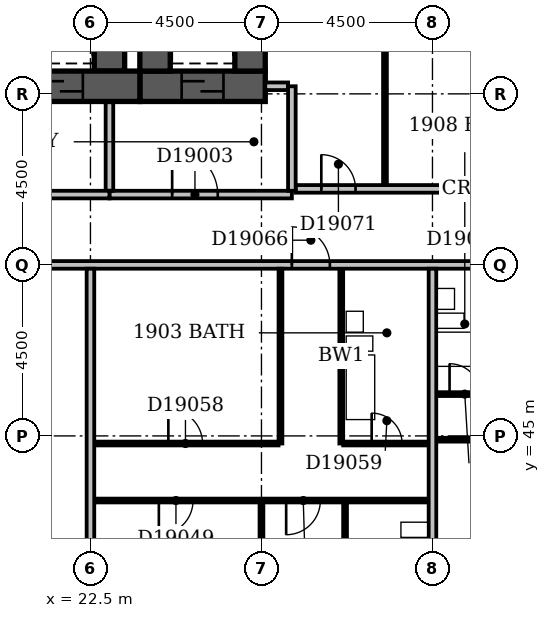
"""IFC4 building model, lengths in metres.
Left out: names, types, materials, properties, quantities, classifications, styles, units other than length and angle.
Written with IfcOpenShell. Run it as: python <this file> out.ifc"""

import sys

from ifc_helpers import new_model, si_unit, direction, frame, frame_2d, origin, place, context, subcontext, project, spatial, rectangle, extrude, element, fill, save


model = new_model("IFC4")
c1 = context("Model", 3, precision=1e-05, world=origin(), true_north=direction((0.0, 1.0)))
c2 = subcontext(c1, "Body", "Model", "MODEL_VIEW")
j1 = project(units=[si_unit("LENGTHUNIT", "METRE"), si_unit("PLANEANGLEUNIT", "RADIAN")], contexts=[c1])
p1 = place(None, origin())
s1 = spatial("IfcSite", under=j1, at=p1, CompositionType="ELEMENT")
p2 = place(p1, origin())
s2 = spatial("IfcBuilding", under=s1, at=p2, CompositionType="ELEMENT")
p3 = place(p2, frame((0.0, 0.0, 79.4)))
s3 = spatial("IfcBuildingStorey", under=s2, at=p3, CompositionType="ELEMENT", Elevation=79.4)
p4 = place(p3, frame((7.35, 54.2, -0.3), z_axis=(0.0, 0.0, 1.0), x_axis=(1.0, 0.0, 0.0)))
e1 = element("IfcWall", 1, at=p4, inside=s3, PredefinedType="SHEAR", context=c2, shape_type="SweptSolid", body=[
    extrude(rectangle(XDim=16.45, YDim=0.8, at=frame_2d((8.225, 0.0))), origin(), (0.0, 0.0, 1.0), 3.6),
])
p5 = place(p4, frame((1.35, 0.0, 0.3)))
e2 = element("IfcOpeningElement", 2, at=p5, cuts=e1, PredefinedType="OPENING", context=c2, shape_type="SweptSolid", body=[
    extrude(rectangle(XDim=1.1, YDim=2.1, at=frame_2d((0.55, 1.05))), frame((0.0, 0.412, 0.0), z_axis=(0.0, -1.0, 0.0), x_axis=(1.0, 0.0, 0.0)), (0.0, 0.0, 1.0), 0.824),
])
p6 = place(p4, frame((3.85, 0.0, 0.3)))
e3 = element("IfcOpeningElement", 3, at=p6, cuts=e1, PredefinedType="OPENING", context=c2, shape_type="SweptSolid", body=[
    extrude(rectangle(XDim=1.1, YDim=2.1, at=frame_2d((0.55, 1.05))), frame((0.0, 0.412, 0.0), z_axis=(0.0, -1.0, 0.0), x_axis=(1.0, 0.0, 0.0)), (0.0, 0.0, 1.0), 0.824),
])
p7 = place(p4, frame((6.35, 0.0, 0.3)))
e4 = element("IfcOpeningElement", 4, at=p7, cuts=e1, PredefinedType="OPENING", context=c2, shape_type="SweptSolid", body=[
    extrude(rectangle(XDim=1.1, YDim=2.1, at=frame_2d((0.55, 1.05))), frame((0.0, 0.412, 0.0), z_axis=(0.0, -1.0, 0.0), x_axis=(1.0, 0.0, 0.0)), (0.0, 0.0, 1.0), 0.824),
])
p8 = place(p4, frame((8.85, 0.0, 0.3)))
e5 = element("IfcOpeningElement", 5, at=p8, cuts=e1, PredefinedType="OPENING", context=c2, shape_type="SweptSolid", body=[
    extrude(rectangle(XDim=1.1, YDim=2.1, at=frame_2d((0.55, 1.05))), frame((0.0, 0.412, 0.0), z_axis=(0.0, -1.0, 0.0), x_axis=(1.0, 0.0, 0.0)), (0.0, 0.0, 1.0), 0.824),
])
p9 = place(p4, frame((11.35, 0.0, 0.3)))
e6 = element("IfcOpeningElement", 6, at=p9, cuts=e1, PredefinedType="OPENING", context=c2, shape_type="SweptSolid", body=[
    extrude(rectangle(XDim=1.1, YDim=2.1, at=frame_2d((0.55, 1.05))), frame((0.0, 0.412, 0.0), z_axis=(0.0, -1.0, 0.0), x_axis=(1.0, 0.0, 0.0)), (0.0, 0.0, 1.0), 0.824),
])
p10 = place(p4, frame((13.85, 0.0, 0.3)))
e7 = element("IfcOpeningElement", 7, at=p10, cuts=e1, PredefinedType="OPENING", context=c2, shape_type="SweptSolid", body=[
    extrude(rectangle(XDim=1.1, YDim=2.1, at=frame_2d((0.55, 1.05))), frame((0.0, 0.412, 0.0), z_axis=(0.0, -1.0, 0.0), x_axis=(1.0, 0.0, 0.0)), (0.0, 0.0, 1.0), 0.824),
])
p11 = place(p3, frame((23.0, 54.6, -0.3), z_axis=(0.0, 0.0, 1.0), x_axis=(0.0, 1.0, 0.0)))
e8 = element("IfcWall", 8, at=p11, inside=s3, PredefinedType="SHEAR", context=c2, shape_type="SweptSolid", body=[
    extrude(rectangle(XDim=3.0, YDim=0.8, at=frame_2d((1.5, 0.0))), origin(), (0.0, 0.0, 1.0), 3.6),
])
p12 = place(p3, frame((23.8, 54.2, -0.3), z_axis=(0.0, 0.0, 1.0), x_axis=(1.0, 0.0, 0.0)))
e9 = element("IfcWall", 9, at=p12, inside=s3, PredefinedType="SHEAR", context=c2, shape_type="SweptSolid", body=[
    extrude(rectangle(XDim=3.3, YDim=0.8, at=frame_2d((1.65, 0.0))), origin(), (0.0, 0.0, 1.0), 3.6),
])
p13 = place(p12, frame((1.1, 0.0, 0.3)))
e10 = element("IfcOpeningElement", 10, at=p13, cuts=e9, PredefinedType="OPENING", context=c2, shape_type="SweptSolid", body=[
    extrude(rectangle(XDim=1.1, YDim=2.1, at=frame_2d((0.55, 1.05))), frame((0.0, 0.412, 0.0), z_axis=(0.0, -1.0, 0.0), x_axis=(1.0, 0.0, 0.0)), (0.0, 0.0, 1.0), 0.824),
])
for number, where, z_axis, x_axis in (
    (11, (24.2, 54.6, -0.3), (0.0, 0.0, 1.0), (0.0, 1.0, 0.0)),
    (12, (26.7, 54.6, -0.3), (0.0, 0.0, 1.0), (0.0, 1.0, 0.0)),
):
    element("IfcWall", number, at=place(p3, frame(where, z_axis=z_axis, x_axis=x_axis)), inside=s3, PredefinedType="SHEAR", context=c2, shape_type="SweptSolid", body=[
        extrude(rectangle(XDim=3.0, YDim=0.8, at=frame_2d((1.5, 0.0))), origin(), (0.0, 0.0, 1.0), 3.6),
    ])
p14 = place(p3, frame((8.0, 51.35, 0.0), z_axis=(0.0, 0.0, 1.0), x_axis=(1.0, 0.0, 0.0)))
e13 = element("IfcWall", 13, at=p14, inside=s3, PredefinedType="PARTITIONING", context=c2, shape_type="SweptSolid", body=[
    extrude(rectangle(XDim=15.0, YDim=0.2, at=frame_2d((7.5, 0.0))), origin(), (0.0, 0.0, 1.0), 3.3),
])
p15 = place(p14, frame((3.4, 0.0, 0.0)))
e14 = element("IfcOpeningElement", 14, at=p15, cuts=e13, PredefinedType="OPENING", context=c2, shape_type="SweptSolid", body=[
    extrude(rectangle(XDim=1.2, YDim=2.1, at=frame_2d((0.6, 1.05))), frame((0.0, 0.112, 0.0), z_axis=(0.0, -1.0, 0.0), x_axis=(1.0, 0.0, 0.0)), (0.0, 0.0, 1.0), 0.224),
])
p16 = place(p14, frame((9.4, 0.0, 0.0)))
e15 = element("IfcOpeningElement", 15, at=p16, cuts=e13, PredefinedType="OPENING", context=c2, shape_type="SweptSolid", body=[
    extrude(rectangle(XDim=1.2, YDim=2.1, at=frame_2d((0.6, 1.05))), frame((0.0, 0.112, 0.0), z_axis=(0.0, -1.0, 0.0), x_axis=(1.0, 0.0, 0.0)), (0.0, 0.0, 1.0), 0.224),
])
p17 = place(p3, frame((23.0, 51.45, 0.0), z_axis=(0.0, 0.0, 1.0), x_axis=(0.0, 1.0, 0.0)))
e16 = element("IfcWall", 16, at=p17, inside=s3, PredefinedType="PARTITIONING", context=c2, shape_type="SweptSolid", body=[
    extrude(rectangle(XDim=2.33, YDim=0.2, at=frame_2d((1.165, 0.0))), origin(), (0.0, 0.0, 1.0), 3.3),
])
p18 = place(p3, frame((23.0, 51.35, 0.0), z_axis=(0.0, 0.0, 1.0), x_axis=(1.0, 0.0, 0.0)))
e17 = element("IfcWall", 17, at=p18, inside=s3, PredefinedType="PARTITIONING", context=c2, shape_type="SweptSolid", body=[
    extrude(rectangle(XDim=4.8, YDim=0.2, at=frame_2d((2.4, 0.0))), origin(), (0.0, 0.0, 1.0), 3.3),
])
p19 = place(p18, frame((1.65, 0.0, 0.0)))
e18 = element("IfcOpeningElement", 18, at=p19, cuts=e17, PredefinedType="OPENING", context=c2, shape_type="SweptSolid", body=[
    extrude(rectangle(XDim=1.2, YDim=2.1, at=frame_2d((0.6, 1.05))), frame((0.0, 0.112, 0.0), z_axis=(0.0, -1.0, 0.0), x_axis=(1.0, 0.0, 0.0)), (0.0, 0.0, 1.0), 0.224),
])
p20 = place(p3, frame((27.8, 51.45, 0.0), z_axis=(0.0, 0.0, 1.0), x_axis=(0.0, 1.0, 0.0)))
e19 = element("IfcWall", 19, at=p20, inside=s3, PredefinedType="PARTITIONING", context=c2, shape_type="SweptSolid", body=[
    extrude(rectangle(XDim=2.75, YDim=0.2, at=frame_2d((1.375, 0.0))), origin(), (0.0, 0.0, 1.0), 3.3),
])
p21 = place(p3, frame((27.1, 54.2, 0.0), z_axis=(0.0, 0.0, 1.0), x_axis=(1.0, 0.0, 0.0)))
e20 = element("IfcWall", 20, at=p21, inside=s3, PredefinedType="PARTITIONING", context=c2, shape_type="SweptSolid", body=[
    extrude(rectangle(XDim=0.6, YDim=0.2, at=frame_2d((0.3, 0.0))), origin(), (0.0, 0.0, 1.0), 3.3),
])
p22 = place(p3, frame((22.5, 36.6, 0.0), z_axis=(0.0, 0.0, 1.0), x_axis=(0.0, 1.0, 0.0)))
e21 = element("IfcWall", 21, at=p22, inside=s3, PredefinedType="PARTITIONING", context=c2, shape_type="SweptSolid", body=[
    extrude(rectangle(XDim=12.8, YDim=0.2, at=frame_2d((6.4, 0.0))), origin(), (0.0, 0.0, 1.0), 3.3),
])
p23 = place(p3, frame((27.0, 36.6, 0.0), z_axis=(0.0, 0.0, 1.0), x_axis=(0.0, 1.0, 0.0)))
e22 = element("IfcWall", 22, at=p23, inside=s3, PredefinedType="PARTITIONING", context=c2, shape_type="SweptSolid", body=[
    extrude(rectangle(XDim=6.65, YDim=0.1, at=frame_2d((3.325, 0.0))), origin(), (0.0, 0.0, 1.0), 2.6),
])
p24 = place(p3, frame((31.5, 36.6, 0.0), z_axis=(0.0, 0.0, 1.0), x_axis=(0.0, 1.0, 0.0)))
e23 = element("IfcWall", 23, at=p24, inside=s3, PredefinedType="PARTITIONING", context=c2, shape_type="SweptSolid", body=[
    extrude(rectangle(XDim=12.8, YDim=0.2, at=frame_2d((6.4, 0.0))), origin(), (0.0, 0.0, 1.0), 3.3),
])
p25 = place(p3, frame((29.2, 40.4, 0.0), z_axis=(0.0, 0.0, 1.0), x_axis=(0.0, 1.0, 0.0)))
e24 = element("IfcWall", 24, at=p25, inside=s3, PredefinedType="PLUMBINGWALL", context=c2, shape_type="SweptSolid", body=[
    extrude(rectangle(XDim=2.85, YDim=0.1, at=frame_2d((1.425, 0.0))), origin(), (0.0, 0.0, 1.0), 3.3),
])
p26 = place(p25, frame((1.05, 0.0, 0.0)))
e25 = element("IfcOpeningElement", 25, at=p26, cuts=e24, PredefinedType="OPENING", context=c2, shape_type="SweptSolid", body=[
    extrude(rectangle(XDim=0.8, YDim=2.1, at=frame_2d((0.4, 1.05))), frame((0.0, 0.062, 0.0), z_axis=(0.0, -1.0, 0.0), x_axis=(1.0, 0.0, 0.0)), (0.0, 0.0, 1.0), 0.124),
])
p27 = place(p3, frame((22.6, 43.3, 0.0), z_axis=(0.0, 0.0, 1.0), x_axis=(1.0, 0.0, 0.0)))
e26 = element("IfcWall", 26, at=p27, inside=s3, PredefinedType="PARTITIONING", context=c2, shape_type="SweptSolid", body=[
    extrude(rectangle(XDim=8.8, YDim=0.1, at=frame_2d((4.4, 0.0))), origin(), (0.0, 0.0, 1.0), 3.3),
])
p28 = place(p27, frame((1.7, 0.0, 0.0)))
e27 = element("IfcOpeningElement", 27, at=p28, cuts=e26, PredefinedType="OPENING", context=c2, shape_type="SweptSolid", body=[
    extrude(rectangle(XDim=0.9, YDim=2.1, at=frame_2d((0.45, 1.05))), frame((0.0, 0.062, 0.0), z_axis=(0.0, -1.0, 0.0), x_axis=(1.0, 0.0, 0.0)), (0.0, 0.0, 1.0), 0.124),
])
p29 = place(p27, frame((5.05, 0.0, 0.0)))
e28 = element("IfcOpeningElement", 28, at=p29, cuts=e26, PredefinedType="OPENING", context=c2, shape_type="SweptSolid", body=[
    extrude(rectangle(XDim=0.9, YDim=2.1, at=frame_2d((0.45, 1.05))), frame((0.0, 0.062, 0.0), z_axis=(0.0, -1.0, 0.0), x_axis=(1.0, 0.0, 0.0)), (0.0, 0.0, 1.0), 0.124),
])
p30 = place(p3, frame((22.6, 44.8, 0.0), z_axis=(0.0, 0.0, 1.0), x_axis=(1.0, 0.0, 0.0)))
e29 = element("IfcWall", 29, at=p30, inside=s3, PredefinedType="PARTITIONING", context=c2, shape_type="SweptSolid", body=[
    extrude(rectangle(XDim=4.85, YDim=0.1, at=frame_2d((2.425, 0.0))), origin(), (0.0, 0.0, 1.0), 3.3),
])
p31 = place(p30, frame((1.95, 0.0, 0.0)))
e30 = element("IfcOpeningElement", 30, at=p31, cuts=e29, PredefinedType="OPENING", context=c2, shape_type="SweptSolid", body=[
    extrude(rectangle(XDim=0.9, YDim=2.1, at=frame_2d((0.45, 1.05))), frame((0.0, 0.062, 0.0), z_axis=(0.0, -1.0, 0.0), x_axis=(1.0, 0.0, 0.0)), (0.0, 0.0, 1.0), 0.124),
])
p32 = place(p3, frame((27.5, 44.8, 0.0), z_axis=(0.0, 0.0, 1.0), x_axis=(0.0, 1.0, 0.0)))
e31 = element("IfcWall", 31, at=p32, inside=s3, PredefinedType="PARTITIONING", context=c2, shape_type="SweptSolid", body=[
    extrude(rectangle(XDim=4.6, YDim=0.1, at=frame_2d((2.3, 0.0))), origin(), (0.0, 0.0, 1.0), 2.6),
])
p33 = place(p3, frame((29.1, 44.8, 0.0), z_axis=(0.0, 0.0, 1.0), x_axis=(0.0, 1.0, 0.0)))
e32 = element("IfcWall", 32, at=p33, inside=s3, PredefinedType="PLUMBINGWALL", context=c2, shape_type="SweptSolid", body=[
    extrude(rectangle(XDim=4.6, YDim=0.1, at=frame_2d((2.3, 0.0))), origin(), (0.0, 0.0, 1.0), 3.3),
])
p34 = place(p3, frame((29.15, 44.8, 0.0), z_axis=(0.0, 0.0, 1.0), x_axis=(1.0, 0.0, 0.0)))
e33 = element("IfcWall", 33, at=p34, inside=s3, PredefinedType="PARTITIONING", context=c2, shape_type="SweptSolid", body=[
    extrude(rectangle(XDim=2.25, YDim=0.1, at=frame_2d((1.125, 0.0))), origin(), (0.0, 0.0, 1.0), 3.3),
])
p35 = place(p34, frame((0.75, 0.0, 0.0)))
e34 = element("IfcOpeningElement", 34, at=p35, cuts=e33, PredefinedType="OPENING", context=c2, shape_type="SweptSolid", body=[
    extrude(rectangle(XDim=0.8, YDim=2.1, at=frame_2d((0.4, 1.05))), frame((0.0, 0.062, 0.0), z_axis=(0.0, -1.0, 0.0), x_axis=(1.0, 0.0, 0.0)), (0.0, 0.0, 1.0), 0.124),
])
p36 = place(p3, frame((31.6, 44.9, 0.0), z_axis=(0.0, 0.0, 1.0), x_axis=(1.0, 0.0, 0.0)))
e35 = element("IfcWall", 35, at=p36, inside=s3, PredefinedType="PARTITIONING", context=c2, shape_type="SweptSolid", body=[
    extrude(rectangle(XDim=4.3, YDim=0.1, at=frame_2d((2.15, 0.0))), origin(), (0.0, 0.0, 1.0), 3.3),
])
p37 = place(p36, frame((1.7, 0.0, 0.0)))
e36 = element("IfcOpeningElement", 36, at=p37, cuts=e35, PredefinedType="OPENING", context=c2, shape_type="SweptSolid", body=[
    extrude(rectangle(XDim=0.9, YDim=2.1, at=frame_2d((0.45, 1.05))), frame((0.0, 0.062, 0.0), z_axis=(0.0, -1.0, 0.0), x_axis=(1.0, 0.0, 0.0)), (0.0, 0.0, 1.0), 0.124),
])
p38 = place(p3, frame((31.6, 46.1, 0.0), z_axis=(0.0, 0.0, 1.0), x_axis=(1.0, 0.0, 0.0)))
e37 = element("IfcWall", 37, at=p38, inside=s3, PredefinedType="PARTITIONING", context=c2, shape_type="SweptSolid", body=[
    extrude(rectangle(XDim=1.55, YDim=0.1, at=frame_2d((0.775, 0.0))), origin(), (0.0, 0.0, 1.0), 3.3),
])
p39 = place(p38, frame((0.35, 0.0, 0.0)))
e38 = element("IfcOpeningElement", 38, at=p39, cuts=e37, PredefinedType="OPENING", context=c2, shape_type="SweptSolid", body=[
    extrude(rectangle(XDim=0.8, YDim=2.1, at=frame_2d((0.4, 1.05))), frame((0.0, 0.062, 0.0), z_axis=(0.0, -1.0, 0.0), x_axis=(1.0, 0.0, 0.0)), (0.0, 0.0, 1.0), 0.124),
])
p40 = place(p3, frame((9.1, 49.5, 0.0), z_axis=(0.0, 0.0, 1.0), x_axis=(1.0, 0.0, 0.0)))
e39 = element("IfcWall", 39, at=p40, inside=s3, PredefinedType="PARTITIONING", context=c2, shape_type="SweptSolid", body=[
    extrude(rectangle(XDim=57.8, YDim=0.2, at=frame_2d((28.9, 0.0))), origin(), (0.0, 0.0, 1.0), 3.3),
])
p41 = place(p40, frame((18.7, 0.0, 0.0)))
e40 = element("IfcOpeningElement", 40, at=p41, cuts=e39, PredefinedType="OPENING", context=c2, shape_type="SweptSolid", body=[
    extrude(rectangle(XDim=1.0, YDim=2.1, at=frame_2d((0.5, 1.05))), frame((0.0, 0.112, 0.0), z_axis=(0.0, -1.0, 0.0), x_axis=(1.0, 0.0, 0.0)), (0.0, 0.0, 1.0), 0.224),
])
p42 = place(p40, frame((24.35, 0.0, 0.0)))
e41 = element("IfcOpeningElement", 41, at=p42, cuts=e39, PredefinedType="OPENING", context=c2, shape_type="SweptSolid", body=[
    extrude(rectangle(XDim=1.0, YDim=2.1, at=frame_2d((0.5, 1.05))), frame((0.0, 0.112, 0.0), z_axis=(0.0, -1.0, 0.0), x_axis=(1.0, 0.0, 0.0)), (0.0, 0.0, 1.0), 0.224),
])
p43 = place(p40, frame((27.2, 0.0, 0.0)))
e42 = element("IfcOpeningElement", 42, at=p43, cuts=e39, PredefinedType="OPENING", context=c2, shape_type="SweptSolid", body=[
    extrude(rectangle(XDim=1.0, YDim=2.1, at=frame_2d((0.5, 1.05))), frame((0.0, 0.112, 0.0), z_axis=(0.0, -1.0, 0.0), x_axis=(1.0, 0.0, 0.0)), (0.0, 0.0, 1.0), 0.224),
])
p44 = place(p40, frame((43.1, 0.0, 0.0)))
e43 = element("IfcOpeningElement", 43, at=p44, cuts=e39, PredefinedType="OPENING", context=c2, shape_type="SweptSolid", body=[
    extrude(rectangle(XDim=1.0, YDim=2.1, at=frame_2d((0.5, 1.05))), frame((0.0, 0.112, 0.0), z_axis=(0.0, -1.0, 0.0), x_axis=(1.0, 0.0, 0.0)), (0.0, 0.0, 1.0), 0.224),
])
p45 = place(p40, frame((3.9, 0.0, 0.0)))
e44 = element("IfcOpeningElement", 44, at=p45, cuts=e39, PredefinedType="OPENING", context=c2, shape_type="SweptSolid", body=[
    extrude(rectangle(XDim=0.9, YDim=2.1, at=frame_2d((0.45, 1.05))), frame((0.0, 0.112, 0.0), z_axis=(0.0, -1.0, 0.0), x_axis=(1.0, 0.0, 0.0)), (0.0, 0.0, 1.0), 0.224),
])
p46 = place(p3, frame((27.9, 51.5, 0.0), z_axis=(0.0, 0.0, 1.0), x_axis=(1.0, 0.0, 0.0)))
e45 = element("IfcWall", 45, at=p46, inside=s3, PredefinedType="PARTITIONING", context=c2, shape_type="SweptSolid", body=[
    extrude(rectangle(XDim=9.3, YDim=0.2, at=frame_2d((4.65, 0.0))), origin(), (0.0, 0.0, 1.0), 3.3),
])
p47 = place(p46, frame((0.675, 0.0, 0.0)))
e46 = element("IfcOpeningElement", 46, at=p47, cuts=e45, PredefinedType="OPENING", context=c2, shape_type="SweptSolid", body=[
    extrude(rectangle(XDim=0.9, YDim=2.1, at=frame_2d((0.45, 1.05))), frame((0.0, 0.112, 0.0), z_axis=(0.0, -1.0, 0.0), x_axis=(1.0, 0.0, 0.0)), (0.0, 0.0, 1.0), 0.224),
])
p48 = place(p46, frame((5.375, 0.0, 0.0)))
e47 = element("IfcOpeningElement", 47, at=p48, cuts=e45, PredefinedType="OPENING", context=c2, shape_type="SweptSolid", body=[
    extrude(rectangle(XDim=1.0, YDim=2.1, at=frame_2d((0.5, 1.05))), frame((0.0, 0.112, 0.0), z_axis=(0.0, -1.0, 0.0), x_axis=(1.0, 0.0, 0.0)), (0.0, 0.0, 1.0), 0.224),
])
p49 = place(p3, frame((30.25, 51.6, 0.0), z_axis=(0.0, 0.0, 1.0), x_axis=(0.0, 1.0, 0.0)))
e48 = element("IfcWall", 48, at=p49, inside=s3, PredefinedType="PARTITIONING", context=c2, shape_type="SweptSolid", body=[
    extrude(rectangle(XDim=3.8, YDim=0.1, at=frame_2d((1.9, 0.0))), origin(), (0.0, 0.0, 1.0), 3.3),
])
p50 = place(p19, origin())
e49 = element("IfcDoor", 49, at=p50, inside=s3, OperationType="SINGLE_SWING_LEFT", PredefinedType="DOOR", context=c2, shape_type="SweptSolid", body=[
    extrude(rectangle(XDim=1.2, YDim=2.1, at=frame_2d((0.6, 1.05))), frame((0.0, 0.025, 0.0), z_axis=(0.0, -1.0, 0.0), x_axis=(1.0, 0.0, 0.0)), (0.0, 0.0, 1.0), 0.05),
])
fill(e18, e49)
p51 = place(p13, origin())
e50 = element("IfcDoor", 50, at=p51, inside=s3, OperationType="SLIDING_TO_LEFT", PredefinedType="DOOR", context=c2, shape_type="SweptSolid", body=[
    extrude(rectangle(XDim=1.1, YDim=2.1, at=frame_2d((0.55, 1.05))), frame((0.0, 0.025, 0.0), z_axis=(0.0, -1.0, 0.0), x_axis=(1.0, 0.0, 0.0)), (0.0, 0.0, 1.0), 0.05),
])
fill(e10, e50)
p52 = place(p10, origin())
e51 = element("IfcDoor", 51, at=p52, inside=s3, OperationType="SLIDING_TO_LEFT", PredefinedType="DOOR", context=c2, shape_type="SweptSolid", body=[
    extrude(rectangle(XDim=1.1, YDim=2.1, at=frame_2d((0.55, 1.05))), frame((0.0, 0.025, 0.0), z_axis=(0.0, -1.0, 0.0), x_axis=(1.0, 0.0, 0.0)), (0.0, 0.0, 1.0), 0.05),
])
fill(e7, e51)
p53 = place(p28, frame((0.9, 0.0, 0.0), z_axis=(0.0, 0.0, 1.0), x_axis=(-1.0, 0.0, 0.0)))
e52 = element("IfcDoor", 52, at=p53, inside=s3, OperationType="SINGLE_SWING_RIGHT", PredefinedType="DOOR", context=c2, shape_type="SweptSolid", body=[
    extrude(rectangle(XDim=0.9, YDim=2.1, at=frame_2d((0.45, 1.05))), frame((0.0, 0.025, 0.0), z_axis=(0.0, -1.0, 0.0), x_axis=(1.0, 0.0, 0.0)), (0.0, 0.0, 1.0), 0.05),
])
fill(e27, e52)
p54 = place(p29, frame((0.9, 0.0, 0.0), z_axis=(0.0, 0.0, 1.0), x_axis=(-1.0, 0.0, 0.0)))
e53 = element("IfcDoor", 53, at=p54, inside=s3, OperationType="SINGLE_SWING_RIGHT", PredefinedType="DOOR", context=c2, shape_type="SweptSolid", body=[
    extrude(rectangle(XDim=0.9, YDim=2.1, at=frame_2d((0.45, 1.05))), frame((0.0, 0.025, 0.0), z_axis=(0.0, -1.0, 0.0), x_axis=(1.0, 0.0, 0.0)), (0.0, 0.0, 1.0), 0.05),
])
fill(e28, e53)
p55 = place(p31, origin())
e54 = element("IfcDoor", 54, at=p55, inside=s3, OperationType="SINGLE_SWING_LEFT", PredefinedType="DOOR", context=c2, shape_type="SweptSolid", body=[
    extrude(rectangle(XDim=0.9, YDim=2.1, at=frame_2d((0.45, 1.05))), frame((0.0, 0.025, 0.0), z_axis=(0.0, -1.0, 0.0), x_axis=(1.0, 0.0, 0.0)), (0.0, 0.0, 1.0), 0.05),
])
fill(e30, e54)
p56 = place(p35, origin())
e55 = element("IfcDoor", 55, at=p56, inside=s3, OperationType="SINGLE_SWING_LEFT", PredefinedType="DOOR", context=c2, shape_type="SweptSolid", body=[
    extrude(rectangle(XDim=0.8, YDim=2.1, at=frame_2d((0.4, 1.05))), frame((0.0, 0.025, 0.0), z_axis=(0.0, -1.0, 0.0), x_axis=(1.0, 0.0, 0.0)), (0.0, 0.0, 1.0), 0.05),
])
fill(e34, e55)
p57 = place(p39, origin())
e56 = element("IfcDoor", 56, at=p57, inside=s3, OperationType="SINGLE_SWING_LEFT", PredefinedType="DOOR", context=c2, shape_type="SweptSolid", body=[
    extrude(rectangle(XDim=0.8, YDim=2.1, at=frame_2d((0.4, 1.05))), frame((0.0, 0.025, 0.0), z_axis=(0.0, -1.0, 0.0), x_axis=(1.0, 0.0, 0.0)), (0.0, 0.0, 1.0), 0.05),
])
fill(e38, e56)
p58 = place(p41, origin())
e57 = element("IfcDoor", 57, at=p58, inside=s3, OperationType="SINGLE_SWING_LEFT", PredefinedType="DOOR", context=c2, shape_type="SweptSolid", body=[
    extrude(rectangle(XDim=1.0, YDim=2.1, at=frame_2d((0.5, 1.05))), frame((0.0, 0.025, 0.0), z_axis=(0.0, -1.0, 0.0), x_axis=(1.0, 0.0, 0.0)), (0.0, 0.0, 1.0), 0.05),
])
fill(e40, e57)
p59 = place(p47, origin())
e58 = element("IfcDoor", 58, at=p59, inside=s3, OperationType="SINGLE_SWING_LEFT", PredefinedType="DOOR", context=c2, shape_type="SweptSolid", body=[
    extrude(rectangle(XDim=0.9, YDim=2.1, at=frame_2d((0.45, 1.05))), frame((0.0, 0.025, 0.0), z_axis=(0.0, -1.0, 0.0), x_axis=(1.0, 0.0, 0.0)), (0.0, 0.0, 1.0), 0.05),
])
fill(e46, e58)
save(model, sys.argv[1])
